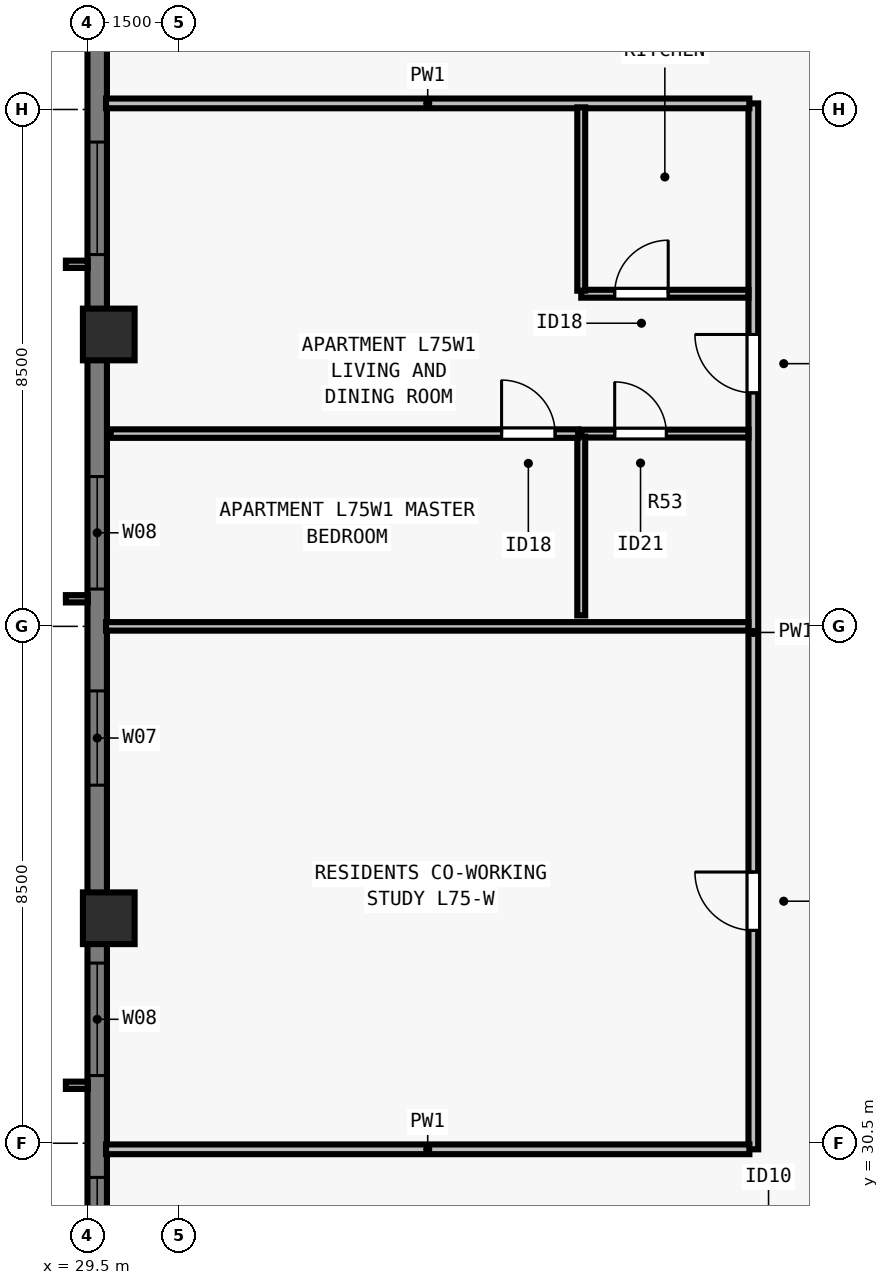
"""IFC4 building model, lengths in metres.
Left out: names, types, materials, properties, quantities, classifications, styles, units other than length and angle.
Written with IfcOpenShell. Run it as: python <this file> out.ifc"""

import sys

from ifc_helpers import new_model, si_unit, direction, frame, frame_2d, origin, origin_2d, place, context, subcontext, project, spatial, rectangle, extrude, element, fill, save


model = new_model("IFC4")
c1 = context("Model", 3, precision=1e-05, world=origin(), true_north=direction((0.0, 1.0)))
c2 = subcontext(c1, "Body", "Model", "MODEL_VIEW")
j1 = project(units=[si_unit("LENGTHUNIT", "METRE"), si_unit("PLANEANGLEUNIT", "RADIAN")], contexts=[c1])
p1 = place(None, origin())
s1 = spatial("IfcSite", under=j1, at=p1, CompositionType="ELEMENT")
p2 = place(p1, origin())
s2 = spatial("IfcBuilding", under=s1, at=p2, CompositionType="ELEMENT")
p3 = place(p2, frame((0.0, 0.0, 272.5)))
s3 = spatial("IfcBuildingStorey", under=s2, at=p3, CompositionType="ELEMENT", Elevation=272.5)
for number, where, z_axis, x_axis in (
    (1, (29.85, 43.8, 0.0), (0.0, 0.0, 1.0), (0.0, 1.0, 0.0)),
    (2, (29.85, 34.2, 0.0), (0.0, 0.0, 1.0), (0.0, 1.0, 0.0)),
):
    element("IfcColumn", number, at=place(p3, frame(where, z_axis=z_axis, x_axis=x_axis)), inside=s3, PredefinedType="COLUMN", context=c2, shape_type="SweptSolid", body=[
        extrude(rectangle(XDim=0.85, YDim=0.85, at=origin_2d()), origin(), (0.0, 0.0, 1.0), 3.5),
    ])
p4 = place(p3, frame((29.66, 21.5, 0.0), z_axis=(0.0, 0.0, 1.0), x_axis=(0.0, 1.0, 0.0)))
e3 = element("IfcWall", 3, at=p4, inside=s3, PredefinedType="SOLIDWALL", context=c2, shape_type="SweptSolid", body=[
    extrude(rectangle(XDim=34.702, YDim=0.32, at=frame_2d((17.351, 0.0))), origin(), (0.0, 0.0, 1.0), 3.24),
])
p5 = place(p4, frame((6.888, 0.0, 0.8)))
e4 = element("IfcOpeningElement", 4, at=p5, cuts=e3, PredefinedType="OPENING", context=c2, shape_type="SweptSolid", body=[
    extrude(rectangle(XDim=1.55, YDim=1.628, at=frame_2d((0.775, 0.814))), frame((0.0, 0.17, 0.0), z_axis=(0.0, -1.0, 0.0), x_axis=(1.0, 0.0, 0.0)), (0.0, 0.0, 1.0), 0.34),
])
p6 = place(p4, frame((10.113, 0.0, 0.8)))
e5 = element("IfcOpeningElement", 5, at=p6, cuts=e3, PredefinedType="OPENING", context=c2, shape_type="SweptSolid", body=[
    extrude(rectangle(XDim=1.85, YDim=1.628, at=frame_2d((0.925, 0.814))), frame((0.0, 0.17, 0.0), z_axis=(0.0, -1.0, 0.0), x_axis=(1.0, 0.0, 0.0)), (0.0, 0.0, 1.0), 0.34),
])
p7 = place(p4, frame((14.888, 0.0, 0.8)))
e6 = element("IfcOpeningElement", 6, at=p7, cuts=e3, PredefinedType="OPENING", context=c2, shape_type="SweptSolid", body=[
    extrude(rectangle(XDim=1.55, YDim=1.628, at=frame_2d((0.775, 0.814))), frame((0.0, 0.17, 0.0), z_axis=(0.0, -1.0, 0.0), x_axis=(1.0, 0.0, 0.0)), (0.0, 0.0, 1.0), 0.34),
])
p8 = place(p4, frame((18.114, 0.0, 0.8)))
e7 = element("IfcOpeningElement", 7, at=p8, cuts=e3, PredefinedType="OPENING", context=c2, shape_type="SweptSolid", body=[
    extrude(rectangle(XDim=1.85, YDim=1.628, at=frame_2d((0.925, 0.814))), frame((0.0, 0.17, 0.0), z_axis=(0.0, -1.0, 0.0), x_axis=(1.0, 0.0, 0.0)), (0.0, 0.0, 1.0), 0.34),
])
p9 = place(p4, frame((23.614, 0.0, 0.8)))
e8 = element("IfcOpeningElement", 8, at=p9, cuts=e3, PredefinedType="OPENING", context=c2, shape_type="SweptSolid", body=[
    extrude(rectangle(XDim=1.85, YDim=1.628, at=frame_2d((0.925, 0.814))), frame((0.0, 0.17, 0.0), z_axis=(0.0, -1.0, 0.0), x_axis=(1.0, 0.0, 0.0)), (0.0, 0.0, 1.0), 0.34),
])
p10 = place(p4, frame((29.24, 0.0, 0.8)))
e9 = element("IfcOpeningElement", 9, at=p10, cuts=e3, PredefinedType="OPENING", context=c2, shape_type="SweptSolid", body=[
    extrude(rectangle(XDim=1.55, YDim=1.628, at=frame_2d((0.775, 0.814))), frame((0.0, 0.17, 0.0), z_axis=(0.0, -1.0, 0.0), x_axis=(1.0, 0.0, 0.0)), (0.0, 0.0, 1.0), 0.34),
])
p11 = place(p3, frame((40.45, 30.4, 0.0), z_axis=(0.0, 0.0, 1.0), x_axis=(0.0, 1.0, 0.0)))
e10 = element("IfcWall", 10, at=p11, inside=s3, PredefinedType="PARTITIONING", context=c2, shape_type="SweptSolid", body=[
    extrude(rectangle(XDim=17.2, YDim=0.16, at=frame_2d((8.6, 0.0))), origin(), (0.0, 0.0, 1.0), 3.24),
])
p12 = place(p11, frame((3.6, 0.0, 0.0)))
e11 = element("IfcOpeningElement", 11, at=p12, cuts=e10, PredefinedType="OPENING", context=c2, shape_type="SweptSolid", body=[
    extrude(rectangle(XDim=0.96, YDim=2.12, at=frame_2d((0.48, 1.06))), frame((0.0, 0.09, 0.0), z_axis=(0.0, -1.0, 0.0), x_axis=(1.0, 0.0, 0.0)), (0.0, 0.0, 1.0), 0.18),
])
p13 = place(p11, frame((12.44, 0.0, 0.0)))
e12 = element("IfcOpeningElement", 12, at=p13, cuts=e10, PredefinedType="OPENING", context=c2, shape_type="SweptSolid", body=[
    extrude(rectangle(XDim=0.96, YDim=2.18, at=frame_2d((0.48, 1.09))), frame((0.0, 0.09, 0.0), z_axis=(0.0, -1.0, 0.0), x_axis=(1.0, 0.0, 0.0)), (0.0, 0.0, 1.0), 0.18),
])
for number, where, z_axis, x_axis in (
    (13, (29.805, 30.4, 0.0), (0.0, 0.0, 1.0), (1.0, 0.0, 0.0)),
    (14, (29.805, 47.6, 0.0), (0.0, 0.0, 1.0), (1.0, 0.0, 0.0)),
):
    element("IfcWall", number, at=place(p3, frame(where, z_axis=z_axis, x_axis=x_axis)), inside=s3, PredefinedType="PARTITIONING", context=c2, shape_type="SweptSolid", body=[
        extrude(rectangle(XDim=10.58, YDim=0.16, at=frame_2d((5.29, 0.0))), origin(), (0.0, 0.0, 1.0), 3.24),
    ])
p14 = place(p3, frame((29.805, 39.0, 0.0), z_axis=(0.0, 0.0, 1.0), x_axis=(1.0, 0.0, 0.0)))
e15 = element("IfcWall", 15, at=p14, inside=s3, PredefinedType="PARTITIONING", context=c2, shape_type="SweptSolid", body=[
    extrude(rectangle(XDim=10.565, YDim=0.14, at=frame_2d((5.283, 0.0))), origin(), (0.0, 0.0, 1.0), 2.908),
])
p15 = place(p3, frame((37.62, 42.17, 0.0), z_axis=(0.0, 0.0, 1.0), x_axis=(1.0, 0.0, 0.0)))
e16 = element("IfcWall", 16, at=p15, inside=s3, PredefinedType="PLUMBINGWALL", context=c2, shape_type="SweptSolid", body=[
    extrude(rectangle(XDim=2.75, YDim=0.13, at=frame_2d((1.375, 0.0))), origin(), (0.0, 0.0, 1.0), 2.908),
])
p16 = place(p15, frame((0.55, 0.0, 0.0)))
e17 = element("IfcOpeningElement", 17, at=p16, cuts=e16, PredefinedType="OPENING", context=c2, shape_type="SweptSolid", body=[
    extrude(rectangle(XDim=0.85, YDim=2.08, at=frame_2d((0.425, 1.04))), frame((0.0, 0.075, 0.0), z_axis=(0.0, -1.0, 0.0), x_axis=(1.0, 0.0, 0.0)), (0.0, 0.0, 1.0), 0.15),
])
p17 = place(p3, frame((37.62, 39.18, 0.0), z_axis=(0.0, 0.0, 1.0), x_axis=(0.0, 1.0, 0.0)))
e18 = element("IfcWall", 18, at=p17, inside=s3, PredefinedType="PLUMBINGWALL", context=c2, shape_type="SweptSolid", body=[
    extrude(rectangle(XDim=2.94, YDim=0.13, at=frame_2d((1.47, 0.0))), origin(), (0.0, 0.0, 1.0), 3.24),
])
p18 = place(p3, frame((37.62, 44.47, 0.0), z_axis=(0.0, 0.0, 1.0), x_axis=(1.0, 0.0, 0.0)))
e19 = element("IfcWall", 19, at=p18, inside=s3, PredefinedType="PLUMBINGWALL", context=c2, shape_type="SweptSolid", body=[
    extrude(rectangle(XDim=2.75, YDim=0.13, at=frame_2d((1.375, 0.0))), origin(), (0.0, 0.0, 1.0), 3.24),
])
p19 = place(p18, frame((0.55, 0.0, 0.0)))
e20 = element("IfcOpeningElement", 20, at=p19, cuts=e19, PredefinedType="OPENING", context=c2, shape_type="SweptSolid", body=[
    extrude(rectangle(XDim=0.88, YDim=2.1, at=frame_2d((0.44, 1.05))), frame((0.0, 0.075, 0.0), z_axis=(0.0, -1.0, 0.0), x_axis=(1.0, 0.0, 0.0)), (0.0, 0.0, 1.0), 0.15),
])
p20 = place(p3, frame((37.62, 44.52, 0.0), z_axis=(0.0, 0.0, 1.0), x_axis=(0.0, 1.0, 0.0)))
e21 = element("IfcWall", 21, at=p20, inside=s3, PredefinedType="PLUMBINGWALL", context=c2, shape_type="SweptSolid", body=[
    extrude(rectangle(XDim=3.015, YDim=0.13, at=frame_2d((1.507, 0.0))), origin(), (0.0, 0.0, 1.0), 3.24),
])
p21 = place(p3, frame((29.88, 42.17, 0.0), z_axis=(0.0, 0.0, 1.0), x_axis=(1.0, 0.0, 0.0)))
e22 = element("IfcWall", 22, at=p21, inside=s3, PredefinedType="PARTITIONING", context=c2, shape_type="SweptSolid", body=[
    extrude(rectangle(XDim=7.69, YDim=0.14, at=frame_2d((3.845, 0.0))), origin(), (0.0, 0.0, 1.0), 3.24),
])
p22 = place(p21, frame((6.43, 0.0, 0.0)))
e23 = element("IfcOpeningElement", 23, at=p22, cuts=e22, PredefinedType="OPENING", context=c2, shape_type="SweptSolid", body=[
    extrude(rectangle(XDim=0.88, YDim=2.1, at=frame_2d((0.44, 1.05))), frame((0.0, 0.08, 0.0), z_axis=(0.0, -1.0, 0.0), x_axis=(1.0, 0.0, 0.0)), (0.0, 0.0, 1.0), 0.16),
])
p23 = place(p5, origin())
e24 = element("IfcWindow", 24, at=p23, inside=s3, PartitioningType="SINGLE_PANEL", PredefinedType="WINDOW", context=c2, shape_type="SweptSolid", body=[
    extrude(rectangle(XDim=1.55, YDim=1.628, at=frame_2d((0.775, 0.814))), frame((0.0, -0.05, 0.0), z_axis=(0.0, -1.0, 0.0), x_axis=(1.0, 0.0, 0.0)), (0.0, 0.0, 1.0), 0.06),
])
fill(e4, e24)
p24 = place(p6, origin())
e25 = element("IfcWindow", 25, at=p24, inside=s3, PartitioningType="SINGLE_PANEL", PredefinedType="WINDOW", context=c2, shape_type="SweptSolid", body=[
    extrude(rectangle(XDim=1.85, YDim=1.628, at=frame_2d((0.925, 0.814))), frame((0.0, -0.05, 0.0), z_axis=(0.0, -1.0, 0.0), x_axis=(1.0, 0.0, 0.0)), (0.0, 0.0, 1.0), 0.06),
])
fill(e5, e25)
p25 = place(p7, origin())
e26 = element("IfcWindow", 26, at=p25, inside=s3, PartitioningType="SINGLE_PANEL", PredefinedType="WINDOW", context=c2, shape_type="SweptSolid", body=[
    extrude(rectangle(XDim=1.55, YDim=1.628, at=frame_2d((0.775, 0.814))), frame((0.0, -0.05, 0.0), z_axis=(0.0, -1.0, 0.0), x_axis=(1.0, 0.0, 0.0)), (0.0, 0.0, 1.0), 0.06),
])
fill(e6, e26)
p26 = place(p8, origin())
e27 = element("IfcWindow", 27, at=p26, inside=s3, PartitioningType="SINGLE_PANEL", PredefinedType="WINDOW", context=c2, shape_type="SweptSolid", body=[
    extrude(rectangle(XDim=1.85, YDim=1.628, at=frame_2d((0.925, 0.814))), frame((0.0, -0.05, 0.0), z_axis=(0.0, -1.0, 0.0), x_axis=(1.0, 0.0, 0.0)), (0.0, 0.0, 1.0), 0.06),
])
fill(e7, e27)
p27 = place(p9, origin())
e28 = element("IfcWindow", 28, at=p27, inside=s3, PartitioningType="SINGLE_PANEL", PredefinedType="WINDOW", context=c2, shape_type="SweptSolid", body=[
    extrude(rectangle(XDim=1.85, YDim=1.628, at=frame_2d((0.925, 0.814))), frame((0.0, -0.05, 0.0), z_axis=(0.0, -1.0, 0.0), x_axis=(1.0, 0.0, 0.0)), (0.0, 0.0, 1.0), 0.06),
])
fill(e8, e28)
p28 = place(p12, origin())
e29 = element("IfcDoor", 29, at=p28, inside=s3, OperationType="SINGLE_SWING_RIGHT", PredefinedType="DOOR", context=c2, shape_type="SweptSolid", body=[
    extrude(rectangle(XDim=0.96, YDim=2.12, at=frame_2d((0.48, 1.06))), frame((0.0, 0.025, 0.0), z_axis=(0.0, -1.0, 0.0), x_axis=(1.0, 0.0, 0.0)), (0.0, 0.0, 1.0), 0.05),
])
fill(e11, e29)
p29 = place(p16, origin())
e30 = element("IfcDoor", 30, at=p29, inside=s3, OperationType="SINGLE_SWING_LEFT", PredefinedType="DOOR", context=c2, shape_type="SweptSolid", body=[
    extrude(rectangle(XDim=0.85, YDim=2.08, at=frame_2d((0.425, 1.04))), frame((0.0, 0.025, 0.0), z_axis=(0.0, -1.0, 0.0), x_axis=(1.0, 0.0, 0.0)), (0.0, 0.0, 1.0), 0.05),
])
fill(e17, e30)
p30 = place(p19, origin())
e31 = element("IfcDoor", 31, at=p30, inside=s3, OperationType="SINGLE_SWING_RIGHT", PredefinedType="DOOR", context=c2, shape_type="SweptSolid", body=[
    extrude(rectangle(XDim=0.88, YDim=2.1, at=frame_2d((0.44, 1.05))), frame((0.0, 0.025, 0.0), z_axis=(0.0, -1.0, 0.0), x_axis=(1.0, 0.0, 0.0)), (0.0, 0.0, 1.0), 0.05),
])
fill(e20, e31)
p31 = place(p22, origin())
e32 = element("IfcDoor", 32, at=p31, inside=s3, OperationType="SINGLE_SWING_LEFT", PredefinedType="DOOR", context=c2, shape_type="SweptSolid", body=[
    extrude(rectangle(XDim=0.88, YDim=2.1, at=frame_2d((0.44, 1.05))), frame((0.0, 0.025, 0.0), z_axis=(0.0, -1.0, 0.0), x_axis=(1.0, 0.0, 0.0)), (0.0, 0.0, 1.0), 0.05),
])
fill(e23, e32)
p32 = place(p13, origin())
e33 = element("IfcDoor", 33, at=p32, inside=s3, OperationType="SINGLE_SWING_RIGHT", PredefinedType="DOOR", context=c2, shape_type="SweptSolid", body=[
    extrude(rectangle(XDim=0.96, YDim=2.18, at=frame_2d((0.48, 1.09))), frame((0.0, 0.025, 0.0), z_axis=(0.0, -1.0, 0.0), x_axis=(1.0, 0.0, 0.0)), (0.0, 0.0, 1.0), 0.05),
])
fill(e12, e33)
save(model, sys.argv[1])
